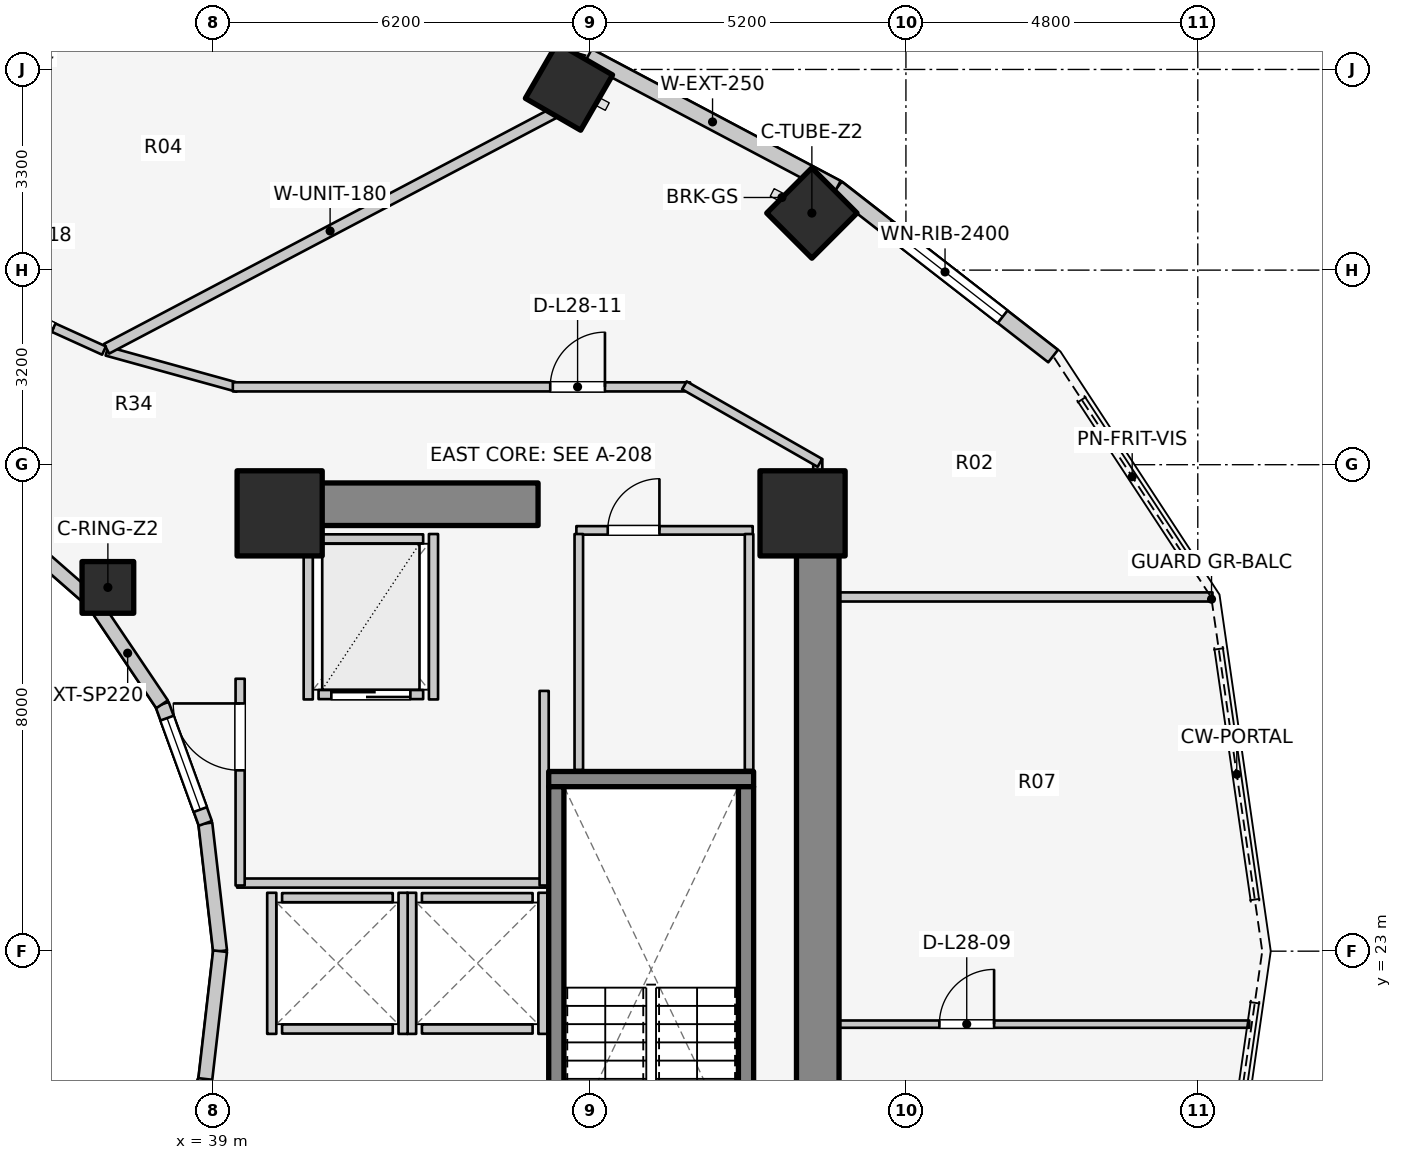
"""IFC4 building model, lengths in metres.
Left out: names, types, materials, properties, quantities, classifications, styles, units other than length and angle.
Written with IfcOpenShell. Run it as: python <this file> out.ifc"""

import sys

from ifc_helpers import new_model, si_unit, direction, frame, frame_2d, origin, origin_2d, place, context, subcontext, project, spatial, rectangle, extrude, element, fill, save


model = new_model("IFC4")
c1 = context("Model", 3, precision=1e-05, world=origin(), true_north=direction((0.0, 1.0)))
c2 = subcontext(c1, "Body", "Model", "MODEL_VIEW")
j1 = project(units=[si_unit("LENGTHUNIT", "METRE"), si_unit("PLANEANGLEUNIT", "RADIAN")], contexts=[c1])
p1 = place(None, origin())
s1 = spatial("IfcSite", under=j1, at=p1, CompositionType="ELEMENT")
p2 = place(p1, origin())
s2 = spatial("IfcBuilding", under=s1, at=p2, CompositionType="ELEMENT")
p3 = place(p2, frame((0.0, 0.0, 94.9)))
s3 = spatial("IfcBuildingStorey", under=s2, at=p3, CompositionType="ELEMENT", Elevation=94.9)
p4 = place(p3, frame((48.95, 17.05, 0.0), z_axis=(0.0, 0.0, 1.0), x_axis=(0.0, 1.0, 0.0)))
e1 = element("IfcWall", 1, at=p4, inside=s3, PredefinedType="SHEAR", context=c2, shape_type="SweptSolid", body=[
    extrude(rectangle(XDim=12.8, YDim=0.7, at=frame_2d((6.4, 0.0))), origin(), (0.0, 0.0, 1.0), 3.1),
])
p5 = place(p3, frame((39.85, 30.35, 0.0), z_axis=(0.0, 0.0, 1.0), x_axis=(1.0, 0.0, 0.0)))
e2 = element("IfcWall", 2, at=p5, inside=s3, PredefinedType="SHEAR", context=c2, shape_type="SweptSolid", body=[
    extrude(rectangle(XDim=4.5, YDim=0.7, at=frame_2d((2.25, 0.0))), origin(), (0.0, 0.0, 1.0), 3.1),
])
p6 = place(p3, frame((44.525, 25.83, 0.0), z_axis=(0.0, 0.0, 1.0), x_axis=(1.0, 0.0, 0.0)))
e3 = element("IfcWall", 3, at=p6, inside=s3, PredefinedType="SOLIDWALL", context=c2, shape_type="SweptSolid", body=[
    extrude(rectangle(XDim=3.37, YDim=0.25, at=frame_2d((1.685, 0.0))), origin(), (0.0, 0.0, 1.0), 3.1),
])
for number, where, z_axis, x_axis in (
    (4, (44.65, 17.895, 0.0), (0.0, 0.0, 1.0), (0.0, 1.0, 0.0)),
    (5, (47.77, 17.895, 0.0), (0.0, 0.0, 1.0), (0.0, 1.0, 0.0)),
):
    element("IfcWall", number, at=place(p3, frame(where, z_axis=z_axis, x_axis=x_axis)), inside=s3, PredefinedType="SOLIDWALL", context=c2, shape_type="SweptSolid", body=[
        extrude(rectangle(XDim=7.81, YDim=0.25, at=frame_2d((3.905, 0.0))), origin(), (0.0, 0.0, 1.0), 3.1),
    ])
for number, where, z_axis, x_axis in (
    (6, (48.7, 30.2, 0.0), (0.0, 0.0, 1.0), (1.0, 0.0, 0.0)),
    (7, (40.1, 30.2, 0.0), (0.0, 0.0, 1.0), (1.0, 0.0, 0.0)),
):
    element("IfcColumn", number, at=place(p3, frame(where, z_axis=z_axis, x_axis=x_axis)), inside=s3, PredefinedType="COLUMN", context=c2, shape_type="SweptSolid", body=[
        extrude(rectangle(XDim=1.4, YDim=1.4, at=origin_2d()), origin(), (0.0, 0.0, 1.0), 3.1),
    ])
p7 = place(p3, frame((37.275, 28.982, 0.0), z_axis=(0.0, 0.0, 1.0), x_axis=(1.0, 0.0, 0.0)))
e8 = element("IfcColumn", 8, at=p7, inside=s3, PredefinedType="COLUMN", context=c2, shape_type="SweptSolid", body=[
    extrude(rectangle(XDim=0.85, YDim=0.85, at=origin_2d()), origin(), (0.0, 0.0, 1.0), 3.1),
])
for number, where, z_axis, x_axis in (
    (9, (48.853, 35.138, 0.0), (0.0, 0.0, 1.0), (0.707, 0.707, 0.0)),
    (10, (44.858, 37.218, 0.0), (0.0, 0.0, 1.0), (0.5, 0.866, 0.0)),
):
    element("IfcColumn", number, at=place(p3, frame(where, z_axis=z_axis, x_axis=x_axis)), inside=s3, PredefinedType="COLUMN", context=c2, shape_type="SweptSolid", body=[
        extrude(rectangle(XDim=1.05, YDim=1.05, at=origin_2d()), origin(), (0.0, 0.0, 1.0), 3.1),
    ])
p8 = place(p3, frame((39.12, 23.0, 0.0), z_axis=(0.0, 0.0, 1.0), x_axis=(-0.114711713601, 0.993398823617, 0.0)))
e11 = element("IfcWall", 11, at=p8, inside=s3, PredefinedType="STANDARD", context=c2, shape_type="SweptSolid", body=[
    extrude(rectangle(XDim=2.115, YDim=0.23, at=frame_2d((1.058, 0.0))), origin(), (0.0, 0.0, 1.0), 2.84),
])
p9 = place(p3, frame((38.877, 25.102, 0.0), z_axis=(0.0, 0.0, 1.0), x_axis=(-0.341423187295, 0.93990968033, 0.0)))
e12 = element("IfcWall", 12, at=p9, inside=s3, PredefinedType="STANDARD", context=c2, shape_type="SweptSolid", body=[
    extrude(rectangle(XDim=2.084, YDim=0.23, at=frame_2d((1.042, 0.0))), origin(), (0.0, 0.0, 1.0), 2.84),
])
p10 = place(p9, frame((0.242, 0.0, 0.85)))
e13 = element("IfcOpeningElement", 13, at=p10, cuts=e12, PredefinedType="OPENING", context=c2, shape_type="SweptSolid", body=[
    extrude(rectangle(XDim=1.6, YDim=1.65, at=frame_2d((0.8, 0.825))), frame((0.0, 0.125, 0.0), z_axis=(0.0, -1.0, 0.0), x_axis=(1.0, 0.0, 0.0)), (0.0, 0.0, 1.0), 0.25),
])
p11 = place(p3, frame((38.166, 27.06, 0.0), z_axis=(0.0, 0.0, 1.0), x_axis=(-0.558197800898, 0.829707909492, 0.0)))
e14 = element("IfcWall", 14, at=p11, inside=s3, PredefinedType="STANDARD", context=c2, shape_type="SweptSolid", body=[
    extrude(rectangle(XDim=2.027, YDim=0.23, at=frame_2d((1.013, 0.0))), origin(), (0.0, 0.0, 1.0), 2.16),
])
p12 = place(p3, frame((37.035, 28.742, 0.0), z_axis=(0.0, 0.0, 1.0), x_axis=(-0.752576694707, 0.658504607869, 0.0)))
e15 = element("IfcWall", 15, at=p12, inside=s3, PredefinedType="STANDARD", context=c2, shape_type="SweptSolid", body=[
    extrude(rectangle(XDim=1.959, YDim=0.23, at=frame_2d((0.98, 0.0))), origin(), (0.0, 0.0, 1.0), 2.16),
])
p13 = place(p3, frame((38.166, 18.94, 0.0), z_axis=(0.0, 0.0, 1.0), x_axis=(0.341423187295, 0.93990968033, 0.0)))
e16 = element("IfcWall", 16, at=p13, inside=s3, PredefinedType="STANDARD", context=c2, shape_type="SweptSolid", body=[
    extrude(rectangle(XDim=2.084, YDim=0.23, at=frame_2d((1.042, 0.0))), origin(), (0.0, 0.0, 1.0), 2.84),
])
p14 = place(p13, frame((0.242, 0.0, 0.85)))
e17 = element("IfcOpeningElement", 17, at=p14, cuts=e16, PredefinedType="OPENING", context=c2, shape_type="SweptSolid", body=[
    extrude(rectangle(XDim=1.6, YDim=1.65, at=frame_2d((0.8, 0.825))), frame((0.0, 0.125, 0.0), z_axis=(0.0, -1.0, 0.0), x_axis=(1.0, 0.0, 0.0)), (0.0, 0.0, 1.0), 0.25),
])
p15 = place(p3, frame((38.877, 20.898, 0.0), z_axis=(0.0, 0.0, 1.0), x_axis=(0.114711713601, 0.993398823617, 0.0)))
e18 = element("IfcWall", 18, at=p15, inside=s3, PredefinedType="STANDARD", context=c2, shape_type="SweptSolid", body=[
    extrude(rectangle(XDim=2.115, YDim=0.23, at=frame_2d((1.058, 0.0))), origin(), (0.0, 0.0, 1.0), 2.84),
])
p16 = place(p3, frame((52.821, 32.786, 0.0), z_axis=(0.0, 0.0, 1.0), x_axis=(-0.789127449954, 0.614229491094, 0.0)))
e19 = element("IfcWall", 19, at=p16, inside=s3, PredefinedType="STANDARD", context=c2, shape_type="SweptSolid", body=[
    extrude(rectangle(XDim=4.505, YDim=0.26, at=frame_2d((2.252, 0.0))), origin(), (0.0, 0.0, 1.0), 2.85),
])
p17 = place(p16, frame((1.052, 0.0, 0.75)))
e20 = element("IfcOpeningElement", 20, at=p17, cuts=e19, PredefinedType="OPENING", context=c2, shape_type="SweptSolid", body=[
    extrude(rectangle(XDim=2.4, YDim=1.7, at=frame_2d((1.2, 0.85))), frame((0.0, 0.14, 0.0), z_axis=(0.0, -1.0, 0.0), x_axis=(1.0, 0.0, 0.0)), (0.0, 0.0, 1.0), 0.28),
])
p18 = place(p3, frame((49.266, 35.553, 0.0), z_axis=(0.0, 0.0, 1.0), x_axis=(-0.883668636807, 0.4681129568, 0.0)))
e21 = element("IfcWall", 21, at=p18, inside=s3, PredefinedType="STANDARD", context=c2, shape_type="SweptSolid", body=[
    extrude(rectangle(XDim=4.631, YDim=0.26, at=frame_2d((2.316, 0.0))), origin(), (0.0, 0.0, 1.0), 2.85),
])
for number, where, z_axis, x_axis in (
    (22, (42.44, 21.72, 0.0), (0.0, 0.0, 1.0), (1.0, 0.0, 0.0)),
    (23, (42.44, 23.88, 0.0), (0.0, 0.0, 1.0), (1.0, 0.0, 0.0)),
):
    element("IfcWall", number, at=place(p3, frame(where, z_axis=z_axis, x_axis=x_axis)), inside=s3, PredefinedType="SOLIDWALL", context=c2, shape_type="SweptSolid", body=[
        extrude(rectangle(XDim=1.82, YDim=0.15, at=frame_2d((0.91, 0.0))), origin(), (0.0, 0.0, 1.0), 2.855),
    ])
for number, where, z_axis, x_axis in (
    (24, (42.27, 21.64, 0.0), (0.0, 0.0, 1.0), (0.0, 1.0, 0.0)),
    (25, (44.43, 21.64, 0.0), (0.0, 0.0, 1.0), (0.0, 1.0, 0.0)),
):
    element("IfcWall", number, at=place(p3, frame(where, z_axis=z_axis, x_axis=x_axis)), inside=s3, PredefinedType="SOLIDWALL", context=c2, shape_type="SweptSolid", body=[
        extrude(rectangle(XDim=2.32, YDim=0.15, at=frame_2d((1.16, 0.0))), origin(), (0.0, 0.0, 1.0), 2.855),
    ])
for number, where, z_axis, x_axis in (
    (26, (40.14, 21.72, 0.0), (0.0, 0.0, 1.0), (1.0, 0.0, 0.0)),
    (27, (40.14, 23.88, 0.0), (0.0, 0.0, 1.0), (1.0, 0.0, 0.0)),
):
    element("IfcWall", number, at=place(p3, frame(where, z_axis=z_axis, x_axis=x_axis)), inside=s3, PredefinedType="SOLIDWALL", context=c2, shape_type="SweptSolid", body=[
        extrude(rectangle(XDim=1.82, YDim=0.15, at=frame_2d((0.91, 0.0))), origin(), (0.0, 0.0, 1.0), 2.12),
    ])
p19 = place(p3, frame((39.97, 21.64, 0.0), z_axis=(0.0, 0.0, 1.0), x_axis=(0.0, 1.0, 0.0)))
e28 = element("IfcWall", 28, at=p19, inside=s3, PredefinedType="SOLIDWALL", context=c2, shape_type="SweptSolid", body=[
    extrude(rectangle(XDim=2.32, YDim=0.15, at=frame_2d((1.16, 0.0))), origin(), (0.0, 0.0, 1.0), 2.12),
])
p20 = place(p3, frame((42.13, 21.64, 0.0), z_axis=(0.0, 0.0, 1.0), x_axis=(0.0, 1.0, 0.0)))
e29 = element("IfcWall", 29, at=p20, inside=s3, PredefinedType="SOLIDWALL", context=c2, shape_type="SweptSolid", body=[
    extrude(rectangle(XDim=2.32, YDim=0.15, at=frame_2d((1.16, 0.0))), origin(), (0.0, 0.0, 1.0), 2.855),
])
p21 = place(p3, frame((40.74, 27.22, 0.0), z_axis=(0.0, 0.0, 1.0), x_axis=(1.0, 0.0, 0.0)))
e30 = element("IfcWall", 30, at=p21, inside=s3, PredefinedType="SOLIDWALL", context=c2, shape_type="SweptSolid", body=[
    extrude(rectangle(XDim=1.72, YDim=0.15, at=frame_2d((0.86, 0.0))), origin(), (0.0, 0.0, 1.0), 2.855),
])
p22 = place(p21, frame((0.21, 0.0, 0.0)))
e31 = element("IfcOpeningElement", 31, at=p22, cuts=e30, PredefinedType="OPENING", context=c2, shape_type="SweptSolid", body=[
    extrude(rectangle(XDim=1.3, YDim=2.1, at=frame_2d((0.65, 1.05))), frame((0.0, 0.085, 0.0), z_axis=(0.0, -1.0, 0.0), x_axis=(1.0, 0.0, 0.0)), (0.0, 0.0, 1.0), 0.17),
])
p23 = place(p3, frame((40.74, 29.78, 0.0), z_axis=(0.0, 0.0, 1.0), x_axis=(1.0, 0.0, 0.0)))
e32 = element("IfcWall", 32, at=p23, inside=s3, PredefinedType="SOLIDWALL", context=c2, shape_type="SweptSolid", body=[
    extrude(rectangle(XDim=1.72, YDim=0.15, at=frame_2d((0.86, 0.0))), origin(), (0.0, 0.0, 1.0), 2.855),
])
for number, where, z_axis, x_axis in (
    (33, (40.57, 27.14, 0.0), (0.0, 0.0, 1.0), (0.0, 1.0, 0.0)),
    (34, (42.63, 27.14, 0.0), (0.0, 0.0, 1.0), (0.0, 1.0, 0.0)),
):
    element("IfcWall", number, at=place(p3, frame(where, z_axis=z_axis, x_axis=x_axis)), inside=s3, PredefinedType="SOLIDWALL", context=c2, shape_type="SweptSolid", body=[
        extrude(rectangle(XDim=2.72, YDim=0.15, at=frame_2d((1.36, 0.0))), origin(), (0.0, 0.0, 1.0), 2.855),
    ])
p24 = place(p3, frame((39.4, 24.12, 0.0), z_axis=(0.0, 0.0, 1.0), x_axis=(1.0, 0.0, 0.0)))
e35 = element("IfcWall", 35, at=p24, inside=s3, PredefinedType="PARTITIONING", context=c2, shape_type="SweptSolid", body=[
    extrude(rectangle(XDim=5.08, YDim=0.15, at=frame_2d((2.54, 0.0))), origin(), (0.0, 0.0, 1.0), 2.12),
])
p25 = place(p3, frame((44.45, 24.08, 0.0), z_axis=(0.0, 0.0, 1.0), x_axis=(0.0, 1.0, 0.0)))
e36 = element("IfcWall", 36, at=p25, inside=s3, PredefinedType="PARTITIONING", context=c2, shape_type="SweptSolid", body=[
    extrude(rectangle(XDim=3.2, YDim=0.15, at=frame_2d((1.6, 0.0))), origin(), (0.0, 0.0, 1.0), 2.855),
])
p26 = place(p3, frame((39.45, 24.08, 0.0), z_axis=(0.0, 0.0, 1.0), x_axis=(0.0, 1.0, 0.0)))
e37 = element("IfcWall", 37, at=p26, inside=s3, PredefinedType="PARTITIONING", context=c2, shape_type="SweptSolid", body=[
    extrude(rectangle(XDim=3.4, YDim=0.15, at=frame_2d((1.7, 0.0))), origin(), (0.0, 0.0, 1.0), 2.855),
])
p27 = place(p26, frame((1.894, 0.0, 0.0)))
e38 = element("IfcOpeningElement", 38, at=p27, cuts=e37, PredefinedType="OPENING", context=c2, shape_type="SweptSolid", body=[
    extrude(rectangle(XDim=1.1, YDim=2.1, at=frame_2d((0.55, 1.05))), frame((0.0, 0.085, 0.0), z_axis=(0.0, -1.0, 0.0), x_axis=(1.0, 0.0, 0.0)), (0.0, 0.0, 1.0), 0.17),
])
p28 = place(p3, frame((44.98, 29.92, 0.0), z_axis=(0.0, 0.0, 1.0), x_axis=(1.0, 0.0, 0.0)))
e39 = element("IfcWall", 39, at=p28, inside=s3, PredefinedType="PLUMBINGWALL", context=c2, shape_type="SweptSolid", body=[
    extrude(rectangle(XDim=2.9, YDim=0.14, at=frame_2d((1.45, 0.0))), origin(), (0.0, 0.0, 1.0), 2.855),
])
p29 = place(p28, frame((0.516, 0.0, 0.0)))
e40 = element("IfcOpeningElement", 40, at=p29, cuts=e39, PredefinedType="OPENING", context=c2, shape_type="SweptSolid", body=[
    extrude(rectangle(XDim=0.85, YDim=2.05, at=frame_2d((0.425, 1.025))), frame((0.0, 0.08, 0.0), z_axis=(0.0, -1.0, 0.0), x_axis=(1.0, 0.0, 0.0)), (0.0, 0.0, 1.0), 0.16),
])
for number, where, z_axis, x_axis in (
    (41, (45.02, 25.98, 0.0), (0.0, 0.0, 1.0), (0.0, 1.0, 0.0)),
    (42, (47.82, 25.98, 0.0), (0.0, 0.0, 1.0), (0.0, 1.0, 0.0)),
):
    element("IfcWall", number, at=place(p3, frame(where, z_axis=z_axis, x_axis=x_axis)), inside=s3, PredefinedType="PLUMBINGWALL", context=c2, shape_type="SweptSolid", body=[
        extrude(rectangle(XDim=3.88, YDim=0.14, at=frame_2d((1.94, 0.0))), origin(), (0.0, 0.0, 1.0), 2.855),
    ])
p30 = place(p3, frame((48.95, 28.825, 0.0), z_axis=(0.0, 0.0, 1.0), x_axis=(1.0, 0.0, 0.0)))
e43 = element("IfcWall", 43, at=p30, inside=s3, PredefinedType="PARTITIONING", context=c2, shape_type="SweptSolid", body=[
    extrude(rectangle(XDim=6.492, YDim=0.15, at=frame_2d((3.246, 0.0))), origin(), (0.0, 0.0, 1.0), 2.855),
])
p31 = place(p3, frame((48.95, 21.8, 0.0), z_axis=(0.0, 0.0, 1.0), x_axis=(1.0, 0.0, 0.0)))
e44 = element("IfcWall", 44, at=p31, inside=s3, PredefinedType="MOVABLE", context=c2, shape_type="SweptSolid", body=[
    extrude(rectangle(XDim=7.097, YDim=0.12, at=frame_2d((3.549, 0.0))), origin(), (0.0, 0.0, 1.0), 2.855),
])
p32 = place(p31, frame((2.0, 0.0, 0.0)))
e45 = element("IfcOpeningElement", 45, at=p32, cuts=e44, PredefinedType="OPENING", context=c2, shape_type="SweptSolid", body=[
    extrude(rectangle(XDim=0.9, YDim=2.1, at=frame_2d((0.45, 1.05))), frame((0.0, 0.07, 0.0), z_axis=(0.0, -1.0, 0.0), x_axis=(1.0, 0.0, 0.0)), (0.0, 0.0, 1.0), 0.14),
])
p33 = place(p3, frame((48.95, 29.8, 0.0), z_axis=(0.0, 0.0, 1.0), x_axis=(0.0, 1.0, 0.0)))
e46 = element("IfcWall", 46, at=p33, inside=s3, PredefinedType="PARTITIONING", context=c2, shape_type="SweptSolid", body=[
    extrude(rectangle(XDim=1.29, YDim=0.15, at=frame_2d((0.645, 0.0))), origin(), (0.0, 0.0, 1.0), 2.142),
])
p34 = place(p3, frame((37.258, 32.867, 0.0), z_axis=(0.0, 0.0, 1.0), x_axis=(0.963833843713, -0.266503886865, 0.0)))
e47 = element("IfcWall", 47, at=p34, inside=s3, PredefinedType="PARTITIONING", context=c2, shape_type="SweptSolid", body=[
    extrude(rectangle(XDim=2.232, YDim=0.15, at=frame_2d((1.116, 0.0))), origin(), (0.0, 0.0, 1.0), 2.272),
])
p35 = place(p3, frame((39.33, 32.28, 0.0), z_axis=(0.0, 0.0, 1.0), x_axis=(1.0, 0.0, 0.0)))
e48 = element("IfcWall", 48, at=p35, inside=s3, PredefinedType="PARTITIONING", context=c2, shape_type="SweptSolid", body=[
    extrude(rectangle(XDim=7.52, YDim=0.15, at=frame_2d((3.76, 0.0))), origin(), (0.0, 0.0, 1.0), 2.272),
])
p36 = place(p35, frame((5.22, 0.0, 0.0)))
e49 = element("IfcOpeningElement", 49, at=p36, cuts=e48, PredefinedType="OPENING", context=c2, shape_type="SweptSolid", body=[
    extrude(rectangle(XDim=0.9, YDim=2.1, at=frame_2d((0.45, 1.05))), frame((0.0, 0.085, 0.0), z_axis=(0.0, -1.0, 0.0), x_axis=(1.0, 0.0, 0.0)), (0.0, 0.0, 1.0), 0.17),
])
p37 = place(p3, frame((46.757, 32.305, 0.0), z_axis=(0.0, 0.0, 1.0), x_axis=(0.867991349648, -0.496579315857, 0.0)))
e50 = element("IfcWall", 50, at=p37, inside=s3, PredefinedType="PARTITIONING", context=c2, shape_type="SweptSolid", body=[
    extrude(rectangle(XDim=2.567, YDim=0.15, at=frame_2d((1.283, 0.0))), origin(), (0.0, 0.0, 1.0), 2.142),
])
p38 = place(p3, frame((37.254, 32.907, 0.0), z_axis=(0.0, 0.0, 1.0), x_axis=(0.884730147854, 0.466103599512, 0.0)))
e51 = element("IfcWall", 51, at=p38, inside=s3, PredefinedType="PARTITIONING", context=c2, shape_type="SweptSolid", body=[
    extrude(rectangle(XDim=8.31, YDim=0.18, at=frame_2d((4.155, 0.0))), origin(), (0.0, 0.0, 1.0), 2.272),
])
p39 = place(p3, frame((37.211, 32.877, 0.0), z_axis=(0.0, 0.0, 1.0), x_axis=(-0.910568469686, 0.41335827319, 0.0)))
e52 = element("IfcWall", 52, at=p39, inside=s3, PredefinedType="PARTITIONING", context=c2, shape_type="SweptSolid", body=[
    extrude(rectangle(XDim=2.772, YDim=0.15, at=frame_2d((1.386, 0.0))), origin(), (0.0, 0.0, 1.0), 2.272),
])
p40 = place(p39, frame((0.911, 0.0, 0.0)))
e53 = element("IfcOpeningElement", 53, at=p40, cuts=e52, PredefinedType="OPENING", context=c2, shape_type="SweptSolid", body=[
    extrude(rectangle(XDim=0.95, YDim=2.1, at=frame_2d((0.475, 1.05))), frame((0.0, 0.085, 0.0), z_axis=(0.0, -1.0, 0.0), x_axis=(1.0, 0.0, 0.0)), (0.0, 0.0, 1.0), 0.17),
])
p41 = place(p10, origin())
e54 = element("IfcWindow", 54, at=p41, inside=s3, PartitioningType="SINGLE_PANEL", PredefinedType="WINDOW", context=c2, shape_type="SweptSolid", body=[
    extrude(rectangle(XDim=1.6, YDim=1.65, at=frame_2d((0.8, 0.825))), frame((0.0, 0.03, 0.0), z_axis=(0.0, -1.0, 0.0), x_axis=(1.0, 0.0, 0.0)), (0.0, 0.0, 1.0), 0.06),
])
fill(e13, e54)
p42 = place(p17, origin())
e55 = element("IfcWindow", 55, at=p42, inside=s3, PartitioningType="SINGLE_PANEL", PredefinedType="WINDOW", context=c2, shape_type="SweptSolid", body=[
    extrude(rectangle(XDim=2.4, YDim=1.7, at=frame_2d((1.2, 0.85))), frame((0.0, 0.03, 0.0), z_axis=(0.0, -1.0, 0.0), x_axis=(1.0, 0.0, 0.0)), (0.0, 0.0, 1.0), 0.06),
])
fill(e20, e55)
p43 = place(p22, origin())
e56 = element("IfcDoor", 56, at=p43, inside=s3, OperationType="DOUBLE_DOOR_SLIDING", PredefinedType="DOOR", context=c2, shape_type="SweptSolid", body=[
    extrude(rectangle(XDim=1.3, YDim=2.1, at=frame_2d((0.65, 1.05))), frame((0.0, 0.025, 0.0), z_axis=(0.0, -1.0, 0.0), x_axis=(1.0, 0.0, 0.0)), (0.0, 0.0, 1.0), 0.05),
])
fill(e31, e56)
p44 = place(p27, origin())
e57 = element("IfcDoor", 57, at=p44, inside=s3, OperationType="SINGLE_SWING_RIGHT", PredefinedType="DOOR", context=c2, shape_type="SweptSolid", body=[
    extrude(rectangle(XDim=1.1, YDim=2.1, at=frame_2d((0.55, 1.05))), frame((0.0, 0.025, 0.0), z_axis=(0.0, -1.0, 0.0), x_axis=(1.0, 0.0, 0.0)), (0.0, 0.0, 1.0), 0.05),
])
fill(e38, e57)
p45 = place(p29, origin())
e58 = element("IfcDoor", 58, at=p45, inside=s3, OperationType="SINGLE_SWING_RIGHT", PredefinedType="DOOR", context=c2, shape_type="SweptSolid", body=[
    extrude(rectangle(XDim=0.85, YDim=2.05, at=frame_2d((0.425, 1.025))), frame((0.0, 0.025, 0.0), z_axis=(0.0, -1.0, 0.0), x_axis=(1.0, 0.0, 0.0)), (0.0, 0.0, 1.0), 0.05),
])
fill(e40, e58)
p46 = place(p32, origin())
e59 = element("IfcDoor", 59, at=p46, inside=s3, OperationType="SINGLE_SWING_RIGHT", PredefinedType="DOOR", context=c2, shape_type="SweptSolid", body=[
    extrude(rectangle(XDim=0.9, YDim=2.1, at=frame_2d((0.45, 1.05))), frame((0.0, 0.025, 0.0), z_axis=(0.0, -1.0, 0.0), x_axis=(1.0, 0.0, 0.0)), (0.0, 0.0, 1.0), 0.05),
])
fill(e45, e59)
p47 = place(p36, origin())
e60 = element("IfcDoor", 60, at=p47, inside=s3, OperationType="SINGLE_SWING_RIGHT", PredefinedType="DOOR", context=c2, shape_type="SweptSolid", body=[
    extrude(rectangle(XDim=0.9, YDim=2.1, at=frame_2d((0.45, 1.05))), frame((0.0, 0.025, 0.0), z_axis=(0.0, -1.0, 0.0), x_axis=(1.0, 0.0, 0.0)), (0.0, 0.0, 1.0), 0.05),
])
fill(e49, e60)
p48 = place(p40, origin())
e61 = element("IfcDoor", 61, at=p48, inside=s3, OperationType="SINGLE_SWING_LEFT", PredefinedType="DOOR", context=c2, shape_type="SweptSolid", body=[
    extrude(rectangle(XDim=0.95, YDim=2.1, at=frame_2d((0.475, 1.05))), frame((0.0, 0.025, 0.0), z_axis=(0.0, -1.0, 0.0), x_axis=(1.0, 0.0, 0.0)), (0.0, 0.0, 1.0), 0.05),
])
fill(e53, e61)
save(model, sys.argv[1])
